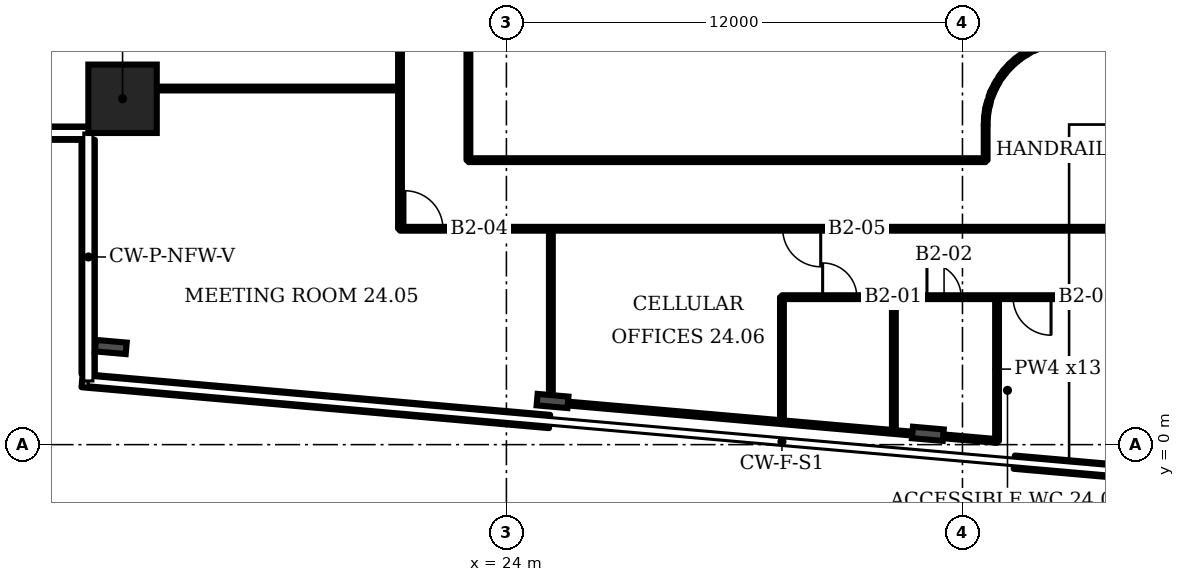
"""IFC4 building model, lengths in metres.
Left out: names, types, materials, properties, quantities, classifications, styles, units other than length and angle.
Written with IfcOpenShell. Run it as: python <this file> out.ifc"""

import sys

from ifc_helpers import new_model, si_unit, direction, frame, frame_2d, origin, origin_2d, place, context, subcontext, project, spatial, rectangle, i_section, extrude, element, fill, save


model = new_model("IFC4")
c1 = context("Model", 3, precision=1e-05, world=origin(), true_north=direction((0.0, 1.0)))
c2 = subcontext(c1, "Body", "Model", "MODEL_VIEW")
j1 = project(units=[si_unit("LENGTHUNIT", "METRE"), si_unit("PLANEANGLEUNIT", "RADIAN")], contexts=[c1])
p1 = place(None, origin())
s1 = spatial("IfcSite", under=j1, at=p1, CompositionType="ELEMENT")
p2 = place(p1, origin())
s2 = spatial("IfcBuilding", under=s1, at=p2, CompositionType="ELEMENT")
p3 = place(p2, frame((0.0, 0.0, 107.5)))
s3 = spatial("IfcBuildingStorey", under=s2, at=p3, CompositionType="ELEMENT", Elevation=107.5)
p4 = place(p3, frame((13.9, 9.1, 0.0), z_axis=(0.0, 0.0, 1.0), x_axis=(1.0, 0.0, 0.0)))
e1 = element("IfcColumn", 1, at=p4, inside=s3, PredefinedType="COLUMN", context=c2, shape_type="SweptSolid", body=[
    extrude(rectangle(XDim=1.8, YDim=1.8, at=origin_2d()), origin(), (0.0, 0.0, 1.0), 3.6),
])
for number, where, z_axis, x_axis in (
    (2, (13.591, 2.569, 0.0), (0.0, 0.0, 1.0), (-0.087, -0.996, 0.0)),
    (3, (25.214, 1.149, 0.0), (0.0, 0.0, 1.0), (-0.087, -0.996, 0.0)),
    (4, (35.089, 0.285, 0.0), (0.0, 0.0, 1.0), (-0.087, -0.996, 0.0)),
):
    element("IfcColumn", number, at=place(p3, frame(where, z_axis=z_axis, x_axis=x_axis)), inside=s3, PredefinedType="COLUMN", context=c2, shape_type="SweptSolid", body=[
        extrude(i_section(OverallWidth=0.303, OverallDepth=0.814, WebThickness=0.021, FlangeThickness=0.04, FilletRadius=0.03, at=origin_2d()), origin(), (0.0, 0.0, 1.0), 3.6),
    ])
p5 = place(p3, frame((12.835, 1.685, 0.0), z_axis=(0.0, 0.0, 1.0), x_axis=(0.996192, -0.087173, 0.0)))
e5 = element("IfcWall", 5, at=p5, inside=s3, PredefinedType="SOLIDWALL", context=c2, shape_type="SweptSolid", body=[
    extrude(rectangle(XDim=12.348, YDim=0.35, at=frame_2d((6.174, 0.0))), origin(), (0.0, 0.0, 1.0), 1.0),
])
p6 = place(p3, frame((37.363, -0.461, 0.0), z_axis=(0.0, 0.0, 1.0), x_axis=(0.996194, -0.087159, 0.0)))
e6 = element("IfcWall", 6, at=p6, inside=s3, PredefinedType="SOLIDWALL", context=c2, shape_type="SweptSolid", body=[
    extrude(rectangle(XDim=12.199, YDim=0.35, at=frame_2d((6.099, 0.0))), origin(), (0.0, 0.0, 1.0), 1.0),
])
p7 = place(p3, frame((9.036, 8.195, 0.0), z_axis=(0.0, 0.0, 1.0), x_axis=(1.0, 0.0, 0.0)))
e7 = element("IfcWall", 7, at=p7, inside=s3, PredefinedType="SOLIDWALL", context=c2, shape_type="SweptSolid", body=[
    extrude(rectangle(XDim=3.964, YDim=0.35, at=frame_2d((1.982, 0.0))), origin(), (0.0, 0.0, 1.0), 1.0),
])
p8 = place(p3, frame((12.995, 8.02, 0.0), z_axis=(0.0, 0.0, 1.0), x_axis=(0.0, -1.0, 0.0)))
e8 = element("IfcWall", 8, at=p8, inside=s3, PredefinedType="SOLIDWALL", context=c2, shape_type="SweptSolid", body=[
    extrude(rectangle(XDim=6.161, YDim=0.35, at=frame_2d((3.081, 0.0))), origin(), (0.0, 0.0, 1.0), 1.0),
])
p9 = place(p3, frame((14.81, 9.37, 0.0), z_axis=(0.0, 0.0, 1.0), x_axis=(1.0, 0.0, 0.0)))
e9 = element("IfcWall", 9, at=p9, inside=s3, PredefinedType="PARTITIONING", context=c2, shape_type="SweptSolid", body=[
    extrude(rectangle(XDim=6.39, YDim=0.1, at=frame_2d((3.195, 0.0))), origin(), (0.0, 0.0, 1.0), 3.2),
])
p10 = place(p3, frame((21.2, 5.68, 0.0), z_axis=(0.0, 0.0, 1.0), x_axis=(0.0, 1.0, 0.0)))
e10 = element("IfcWall", 10, at=p10, inside=s3, PredefinedType="PARTITIONING", context=c2, shape_type="SweptSolid", body=[
    extrude(rectangle(XDim=15.87, YDim=0.1, at=frame_2d((7.935, 0.0))), origin(), (0.0, 0.0, 1.0), 3.2),
])
p11 = place(p10, frame((11.85, 0.0, 0.0)))
e11 = element("IfcOpeningElement", 11, at=p11, cuts=e10, PredefinedType="OPENING", context=c2, shape_type="SweptSolid", body=[
    extrude(rectangle(XDim=1.0, YDim=2.1, at=frame_2d((0.5, 1.05))), frame((0.0, 0.06, 0.0), z_axis=(0.0, -1.0, 0.0), x_axis=(1.0, 0.0, 0.0)), (0.0, 0.0, 1.0), 0.12),
])
p12 = place(p3, frame((21.2, 5.68, 0.0), z_axis=(0.0, 0.0, 1.0), x_axis=(1.0, 0.0, 0.0)))
e12 = element("IfcWall", 12, at=p12, inside=s3, PredefinedType="PARTITIONING", context=c2, shape_type="SweptSolid", body=[
    extrude(rectangle(XDim=19.985, YDim=0.1, at=frame_2d((9.993, 0.0))), origin(), (0.0, 0.0, 1.0), 3.2),
])
p13 = place(p12, frame((0.13, 0.0, 0.0)))
e13 = element("IfcOpeningElement", 13, at=p13, cuts=e12, PredefinedType="OPENING", context=c2, shape_type="SweptSolid", body=[
    extrude(rectangle(XDim=1.0, YDim=2.1, at=frame_2d((0.5, 1.05))), frame((0.0, 0.06, 0.0), z_axis=(0.0, -1.0, 0.0), x_axis=(1.0, 0.0, 0.0)), (0.0, 0.0, 1.0), 0.12),
])
p14 = place(p12, frame((10.07, 0.0, 0.0)))
e14 = element("IfcOpeningElement", 14, at=p14, cuts=e12, PredefinedType="OPENING", context=c2, shape_type="SweptSolid", body=[
    extrude(rectangle(XDim=1.0, YDim=2.1, at=frame_2d((0.5, 1.05))), frame((0.0, 0.06, 0.0), z_axis=(0.0, -1.0, 0.0), x_axis=(1.0, 0.0, 0.0)), (0.0, 0.0, 1.0), 0.12),
])
p15 = place(p3, frame((23.0, 7.485, 0.0), z_axis=(0.0, 0.0, 1.0), x_axis=(0.0, 1.0, 0.0)))
e15 = element("IfcWall", 15, at=p15, inside=s3, PredefinedType="PARTITIONING", context=c2, shape_type="SweptSolid", body=[
    extrude(rectangle(XDim=18.015, YDim=0.1, at=frame_2d((9.007, 0.0))), origin(), (0.0, 0.0, 1.0), 3.2),
])
p16 = place(p15, frame((13.029, 0.0, 0.0)))
e16 = element("IfcOpeningElement", 16, at=p16, cuts=e15, PredefinedType="OPENING", context=c2, shape_type="SweptSolid", body=[
    extrude(rectangle(XDim=1.8, YDim=2.1, at=frame_2d((0.9, 1.05))), frame((0.0, 0.06, 0.0), z_axis=(0.0, -1.0, 0.0), x_axis=(1.0, 0.0, 0.0)), (0.0, 0.0, 1.0), 0.12),
])
p17 = place(p3, frame((23.0, 7.485, 0.0), z_axis=(0.0, 0.0, 1.0), x_axis=(1.0, 0.0, 0.0)))
e17 = element("IfcWall", 17, at=p17, inside=s3, PredefinedType="PARTITIONING", context=c2, shape_type="SweptSolid", body=[
    extrude(rectangle(XDim=13.61, YDim=0.1, at=frame_2d((6.805, 0.0))), origin(), (0.0, 0.0, 1.0), 3.2),
])
p18 = place(p3, frame((25.17, 1.12, 0.0), z_axis=(0.0, 0.0, 1.0), x_axis=(0.0, 1.0, 0.0)))
e18 = element("IfcWall", 18, at=p18, inside=s3, PredefinedType="PARTITIONING", context=c2, shape_type="SweptSolid", body=[
    extrude(rectangle(XDim=4.56, YDim=0.1, at=frame_2d((2.28, 0.0))), origin(), (0.0, 0.0, 1.0), 3.2),
])
p19 = place(p3, frame((31.25, 0.59, 0.0), z_axis=(0.0, 0.0, 1.0), x_axis=(-0.996218, 0.086845, 0.0)))
e19 = element("IfcWall", 19, at=p19, inside=s3, PredefinedType="PARTITIONING", context=c2, shape_type="SweptSolid", body=[
    extrude(rectangle(XDim=6.103, YDim=0.1, at=frame_2d((3.052, 0.0))), origin(), (0.0, 0.0, 1.0), 2.58),
])
p20 = place(p3, frame((31.25, 0.59, 0.0), z_axis=(0.0, 0.0, 1.0), x_axis=(0.0, 1.0, 0.0)))
e20 = element("IfcWall", 20, at=p20, inside=s3, PredefinedType="PARTITIONING", context=c2, shape_type="SweptSolid", body=[
    extrude(rectangle(XDim=3.29, YDim=0.1, at=frame_2d((1.645, 0.0))), origin(), (0.0, 0.0, 1.0), 3.2),
])
p21 = place(p3, frame((31.25, 3.88, 0.0), z_axis=(0.0, 0.0, 1.0), x_axis=(1.0, 0.0, 0.0)))
e21 = element("IfcWall", 21, at=p21, inside=s3, PredefinedType="PARTITIONING", context=c2, shape_type="SweptSolid", body=[
    extrude(rectangle(XDim=9.935, YDim=0.1, at=frame_2d((4.968, 0.0))), origin(), (0.0, 0.0, 1.0), 3.2),
])
p22 = place(p21, frame((1.071, 0.0, 0.0)))
e22 = element("IfcOpeningElement", 22, at=p22, cuts=e21, PredefinedType="OPENING", context=c2, shape_type="SweptSolid", body=[
    extrude(rectangle(XDim=0.9, YDim=2.1, at=frame_2d((0.45, 1.05))), frame((0.0, 0.06, 0.0), z_axis=(0.0, -1.0, 0.0), x_axis=(1.0, 0.0, 0.0)), (0.0, 0.0, 1.0), 0.12),
])
p23 = place(p21, frame((3.816, 0.0, 0.0)))
e23 = element("IfcOpeningElement", 23, at=p23, cuts=e21, PredefinedType="OPENING", context=c2, shape_type="SweptSolid", body=[
    extrude(rectangle(XDim=0.9, YDim=2.1, at=frame_2d((0.45, 1.05))), frame((0.0, 0.06, 0.0), z_axis=(0.0, -1.0, 0.0), x_axis=(1.0, 0.0, 0.0)), (0.0, 0.0, 1.0), 0.12),
])
p24 = place(p21, frame((6.081, 0.0, 0.0)))
e24 = element("IfcOpeningElement", 24, at=p24, cuts=e21, PredefinedType="OPENING", context=c2, shape_type="SweptSolid", body=[
    extrude(rectangle(XDim=1.0, YDim=2.1, at=frame_2d((0.5, 1.05))), frame((0.0, 0.06, 0.0), z_axis=(0.0, -1.0, 0.0), x_axis=(1.0, 0.0, 0.0)), (0.0, 0.0, 1.0), 0.12),
])
p25 = place(p3, frame((34.195, 0.33, 0.0), z_axis=(0.0, 0.0, 1.0), x_axis=(0.0, 1.0, 0.0)))
e25 = element("IfcWall", 25, at=p25, inside=s3, PredefinedType="PARTITIONING", context=c2, shape_type="SweptSolid", body=[
    extrude(rectangle(XDim=3.55, YDim=0.1, at=frame_2d((1.775, 0.0))), origin(), (0.0, 0.0, 1.0), 3.2),
])
p26 = place(p3, frame((36.61, 7.485, 0.0), z_axis=(0.0, 0.0, 1.0), x_axis=(0.0, 1.0, 0.0)))
e26 = element("IfcWall", 26, at=p26, inside=s3, PredefinedType="PARTITIONING", context=c2, shape_type="SweptSolid", body=[
    extrude(rectangle(XDim=0.93, YDim=0.1, at=frame_2d((0.465, 0.0))), origin(), (0.0, 0.0, 1.0), 3.2),
])
p27 = place(p3, frame((36.61, 8.415, 0.0), z_axis=(0.0, 0.0, 1.0), x_axis=(0.045458, 0.998967, 0.0)))
e27 = element("IfcWall", 27, at=p27, inside=s3, PredefinedType="PARTITIONING", context=c2, shape_type="SweptSolid", body=[
    extrude(rectangle(XDim=0.22, YDim=0.1, at=frame_2d((0.11, 0.0))), origin(), (0.0, 0.0, 1.0), 3.2),
])
p28 = place(p3, frame((36.62, 8.635, 0.0), z_axis=(0.0, 0.0, 1.0), x_axis=(0.140454, 0.990086, 0.0)))
e28 = element("IfcWall", 28, at=p28, inside=s3, PredefinedType="PARTITIONING", context=c2, shape_type="SweptSolid", body=[
    extrude(rectangle(XDim=0.212, YDim=0.1, at=frame_2d((0.106, 0.0))), origin(), (0.0, 0.0, 1.0), 3.2),
])
p29 = place(p3, frame((36.65, 8.845, 0.0), z_axis=(0.0, 0.0, 1.0), x_axis=(0.275016, 0.961438, 0.0)))
e29 = element("IfcWall", 29, at=p29, inside=s3, PredefinedType="PARTITIONING", context=c2, shape_type="SweptSolid", body=[
    extrude(rectangle(XDim=0.109, YDim=0.1, at=frame_2d((0.055, 0.0))), origin(), (0.0, 0.0, 1.0), 3.2),
])
p30 = place(p3, frame((36.68, 8.95, 0.0), z_axis=(0.0, 0.0, 1.0), x_axis=(0.232946, 0.972493, 0.0)))
e30 = element("IfcWall", 30, at=p30, inside=s3, PredefinedType="PARTITIONING", context=c2, shape_type="SweptSolid", body=[
    extrude(rectangle(XDim=0.108, YDim=0.1, at=frame_2d((0.054, 0.0))), origin(), (0.0, 0.0, 1.0), 3.2),
])
p31 = place(p3, frame((36.73, 9.135, 0.0), z_axis=(0.0, 0.0, 1.0), x_axis=(0.3382, 0.941078, 0.0)))
e31 = element("IfcWall", 31, at=p31, inside=s3, PredefinedType="PARTITIONING", context=c2, shape_type="SweptSolid", body=[
    extrude(rectangle(XDim=0.133, YDim=0.1, at=frame_2d((0.066, 0.0))), origin(), (0.0, 0.0, 1.0), 3.2),
])
p32 = place(p3, frame((36.775, 9.26, 0.0), z_axis=(0.0, 0.0, 1.0), x_axis=(0.44838, 0.893848, 0.0)))
e32 = element("IfcWall", 32, at=p32, inside=s3, PredefinedType="PARTITIONING", context=c2, shape_type="SweptSolid", body=[
    extrude(rectangle(XDim=0.168, YDim=0.1, at=frame_2d((0.084, 0.0))), origin(), (0.0, 0.0, 1.0), 3.2),
])
p33 = place(p3, frame((36.87, 9.455, 0.0), z_axis=(0.0, 0.0, 1.0), x_axis=(0.519025, 0.854758, 0.0)))
e33 = element("IfcWall", 33, at=p33, inside=s3, PredefinedType="PARTITIONING", context=c2, shape_type="SweptSolid", body=[
    extrude(rectangle(XDim=0.135, YDim=0.1, at=frame_2d((0.067, 0.0))), origin(), (0.0, 0.0, 1.0), 3.2),
])
p34 = place(p3, frame((36.91, 0.095, 0.0), z_axis=(0.0, 0.0, 1.0), x_axis=(0.0, 1.0, 0.0)))
e34 = element("IfcWall", 34, at=p34, inside=s3, PredefinedType="PARTITIONING", context=c2, shape_type="SweptSolid", body=[
    extrude(rectangle(XDim=3.785, YDim=0.1, at=frame_2d((1.893, 0.0))), origin(), (0.0, 0.0, 1.0), 3.2),
])
p35 = place(p3, frame((36.91, 0.095, 0.0), z_axis=(0.0, 0.0, 1.0), x_axis=(-0.996195, 0.087145, 0.0)))
e35 = element("IfcWall", 35, at=p35, inside=s3, PredefinedType="PARTITIONING", context=c2, shape_type="SweptSolid", body=[
    extrude(rectangle(XDim=5.682, YDim=0.1, at=frame_2d((2.841, 0.0))), origin(), (0.0, 0.0, 1.0), 2.58),
])
p36 = place(p3, frame((36.98, 9.64, 0.0), z_axis=(0.0, 0.0, 1.0), x_axis=(0.596595, 0.802549, 0.0)))
e36 = element("IfcWall", 36, at=p36, inside=s3, PredefinedType="PARTITIONING", context=c2, shape_type="SweptSolid", body=[
    extrude(rectangle(XDim=0.218, YDim=0.1, at=frame_2d((0.109, 0.0))), origin(), (0.0, 0.0, 1.0), 3.2),
])
p37 = place(p3, frame((37.11, 9.815, 0.0), z_axis=(0.0, 0.0, 1.0), x_axis=(0.670589, 0.741832, 0.0)))
e37 = element("IfcWall", 37, at=p37, inside=s3, PredefinedType="PARTITIONING", context=c2, shape_type="SweptSolid", body=[
    extrude(rectangle(XDim=0.216, YDim=0.1, at=frame_2d((0.108, 0.0))), origin(), (0.0, 0.0, 1.0), 3.2),
])
p38 = place(p3, frame((37.255, 9.975, 0.0), z_axis=(0.0, 0.0, 1.0), x_axis=(0.741269, 0.67121, 0.0)))
e38 = element("IfcWall", 38, at=p38, inside=s3, PredefinedType="PARTITIONING", context=c2, shape_type="SweptSolid", body=[
    extrude(rectangle(XDim=0.216, YDim=0.1, at=frame_2d((0.108, 0.0))), origin(), (0.0, 0.0, 1.0), 3.2),
])
p39 = place(p3, frame((37.415, 10.12, 0.0), z_axis=(0.0, 0.0, 1.0), x_axis=(0.803993, 0.594635, 0.0)))
e39 = element("IfcWall", 39, at=p39, inside=s3, PredefinedType="PARTITIONING", context=c2, shape_type="SweptSolid", body=[
    extrude(rectangle(XDim=0.168, YDim=0.1, at=frame_2d((0.084, 0.0))), origin(), (0.0, 0.0, 1.0), 3.2),
])
p40 = place(p3, frame((37.585, 10.245, 0.0), z_axis=(0.0, 0.0, 1.0), x_axis=(0.846156, 0.532926, 0.0)))
e40 = element("IfcWall", 40, at=p40, inside=s3, PredefinedType="PARTITIONING", context=c2, shape_type="SweptSolid", body=[
    extrude(rectangle(XDim=0.112, YDim=0.1, at=frame_2d((0.056, 0.0))), origin(), (0.0, 0.0, 1.0), 3.2),
])
p41 = place(p3, frame((37.68, 10.305, 0.0), z_axis=(0.0, 0.0, 1.0), x_axis=(0.864661, 0.502348, 0.0)))
e41 = element("IfcWall", 41, at=p41, inside=s3, PredefinedType="PARTITIONING", context=c2, shape_type="SweptSolid", body=[
    extrude(rectangle(XDim=0.11, YDim=0.1, at=frame_2d((0.055, 0.0))), origin(), (0.0, 0.0, 1.0), 3.2),
])
p42 = place(p22, origin())
e42 = element("IfcDoor", 42, at=p42, inside=s3, OperationType="SINGLE_SWING_LEFT", PredefinedType="DOOR", context=c2, shape_type="SweptSolid", body=[
    extrude(rectangle(XDim=0.9, YDim=2.1, at=frame_2d((0.45, 1.05))), frame((0.0, 0.025, 0.0), z_axis=(0.0, -1.0, 0.0), x_axis=(1.0, 0.0, 0.0)), (0.0, 0.0, 1.0), 0.05),
])
fill(e22, e42)
p43 = place(p23, origin())
e43 = element("IfcDoor", 43, at=p43, inside=s3, OperationType="SINGLE_SWING_LEFT", PredefinedType="DOOR", context=c2, shape_type="SweptSolid", body=[
    extrude(rectangle(XDim=0.9, YDim=2.1, at=frame_2d((0.45, 1.05))), frame((0.0, 0.025, 0.0), z_axis=(0.0, -1.0, 0.0), x_axis=(1.0, 0.0, 0.0)), (0.0, 0.0, 1.0), 0.05),
])
fill(e23, e43)
p44 = place(p24, origin())
e44 = element("IfcDoor", 44, at=p44, inside=s3, OperationType="SINGLE_SWING_RIGHT", PredefinedType="DOOR", context=c2, shape_type="SweptSolid", body=[
    extrude(rectangle(XDim=1.0, YDim=2.1, at=frame_2d((0.5, 1.05))), frame((0.0, 0.025, 0.0), z_axis=(0.0, -1.0, 0.0), x_axis=(1.0, 0.0, 0.0)), (0.0, 0.0, 1.0), 0.05),
])
fill(e24, e44)
p45 = place(p13, origin())
e45 = element("IfcDoor", 45, at=p45, inside=s3, OperationType="SINGLE_SWING_LEFT", PredefinedType="DOOR", context=c2, shape_type="SweptSolid", body=[
    extrude(rectangle(XDim=1.0, YDim=2.1, at=frame_2d((0.5, 1.05))), frame((0.0, 0.025, 0.0), z_axis=(0.0, -1.0, 0.0), x_axis=(1.0, 0.0, 0.0)), (0.0, 0.0, 1.0), 0.05),
])
fill(e13, e45)
p46 = place(p14, origin())
e46 = element("IfcDoor", 46, at=p46, inside=s3, OperationType="SINGLE_SWING_RIGHT", PredefinedType="DOOR", context=c2, shape_type="SweptSolid", body=[
    extrude(rectangle(XDim=1.0, YDim=2.1, at=frame_2d((0.5, 1.05))), frame((0.0, 0.025, 0.0), z_axis=(0.0, -1.0, 0.0), x_axis=(1.0, 0.0, 0.0)), (0.0, 0.0, 1.0), 0.05),
])
fill(e14, e46)
save(model, sys.argv[1])
